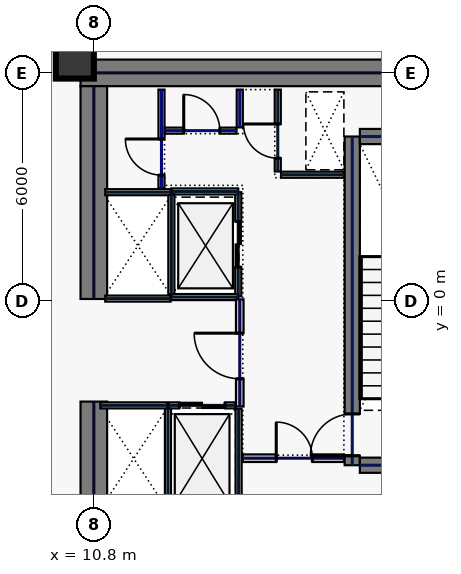
"""IFC4 building model, lengths in metres.
Left out: names, types, materials, properties, quantities, classifications, styles, units other than length and angle.
Written with IfcOpenShell. Run it as: python <this file> out.ifc"""

import sys

from ifc_helpers import new_model, si_unit, direction, frame, frame_2d, origin, origin_2d, place, context, subcontext, project, spatial, rectangle, hollow_rectangle, extrude, element, fill, save


model = new_model("IFC4")
c1 = context("Model", 3, precision=1e-05, world=origin(), true_north=direction((0.0, 1.0)))
c2 = subcontext(c1, "Body", "Model", "MODEL_VIEW")
j1 = project(units=[si_unit("LENGTHUNIT", "METRE"), si_unit("PLANEANGLEUNIT", "RADIAN")], contexts=[c1])
p1 = place(None, origin())
s1 = spatial("IfcSite", under=j1, at=p1, CompositionType="ELEMENT")
p2 = place(p1, origin())
s2 = spatial("IfcBuilding", under=s1, at=p2, CompositionType="ELEMENT")
p3 = place(p2, frame((0.0, 0.0, 89.4)))
s3 = spatial("IfcBuildingStorey", under=s2, at=p3, CompositionType="ELEMENT", Elevation=89.4)
p4 = place(p3, frame((10.45, 6.0, 0.0), z_axis=(0.0, 0.0, 1.0), x_axis=(1.0, 0.0, 0.0)))
e1 = element("IfcWall", 1, at=p4, inside=s3, PredefinedType="SHEAR", context=c2, shape_type="SweptSolid", body=[
    extrude(rectangle(XDim=11.55, YDim=0.7, at=frame_2d((5.775, 0.0))), origin(), (0.0, 0.0, 1.0), 3.74),
])
p5 = place(p3, frame((10.8, -5.65, 0.0), z_axis=(0.0, 0.0, 1.0), x_axis=(0.0, 1.0, 0.0)))
e2 = element("IfcWall", 2, at=p5, inside=s3, PredefinedType="SHEAR", context=c2, shape_type="SweptSolid", body=[
    extrude(rectangle(XDim=3.0, YDim=0.7, at=frame_2d((1.5, 0.0))), origin(), (0.0, 0.0, 1.0), 3.74),
])
p6 = place(p3, frame((10.8, 0.05, 0.0), z_axis=(0.0, 0.0, 1.0), x_axis=(0.0, 1.0, 0.0)))
e3 = element("IfcWall", 3, at=p6, inside=s3, PredefinedType="SHEAR", context=c2, shape_type="SweptSolid", body=[
    extrude(rectangle(XDim=5.6, YDim=0.7, at=frame_2d((2.8, 0.0))), origin(), (0.0, 0.0, 1.0), 3.74),
])
p7 = place(p3, frame((17.6, -4.325, 0.0), z_axis=(0.0, 0.0, 1.0), x_axis=(0.0, 1.0, 0.0)))
e4 = element("IfcWall", 4, at=p7, inside=s3, PredefinedType="SHEAR", context=c2, shape_type="SweptSolid", body=[
    extrude(rectangle(XDim=8.65, YDim=0.4, at=frame_2d((4.325, 0.0))), origin(), (0.0, 0.0, 1.0), 3.74),
])
p8 = place(p7, frame((0.25, 0.0, 0.0)))
e5 = element("IfcOpeningElement", 5, at=p8, cuts=e4, PredefinedType="OPENING", context=c2, shape_type="SweptSolid", body=[
    extrude(rectangle(XDim=1.1, YDim=2.2, at=frame_2d((0.55, 1.1))), frame((0.0, 0.21, 0.0), z_axis=(0.0, -1.0, 0.0), x_axis=(1.0, 0.0, 0.0)), (0.0, 0.0, 1.0), 0.42),
])
for number, where, z_axis, x_axis in (
    (6, (17.8, -4.325, 0.0), (0.0, 0.0, 1.0), (1.0, 0.0, 0.0)),
    (7, (17.8, 4.325, 0.0), (0.0, 0.0, 1.0), (1.0, 0.0, 0.0)),
):
    element("IfcWall", number, at=place(p3, frame(where, z_axis=z_axis, x_axis=x_axis)), inside=s3, PredefinedType="SHEAR", context=c2, shape_type="SweptSolid", body=[
        extrude(rectangle(XDim=3.4, YDim=0.4, at=frame_2d((1.7, 0.0))), origin(), (0.0, 0.0, 1.0), 3.74),
    ])
p9 = place(p3, frame((10.3, 6.35, 0.0), z_axis=(0.0, 0.0, 1.0), x_axis=(1.0, 0.0, 0.0)))
e8 = element("IfcColumn", 8, at=p9, inside=s3, PredefinedType="COLUMN", context=c2, shape_type="SweptSolid", body=[
    extrude(hollow_rectangle(XDim=1.0, YDim=1.0, WallThickness=0.045, at=origin_2d()), origin(), (0.0, 0.0, 1.0), 3.74),
])
p10 = place(p3, frame((14.6, 0.12, 0.0), z_axis=(0.0, 0.0, 1.0), x_axis=(0.0, 1.0, 0.0)))
e9 = element("IfcWall", 9, at=p10, inside=s3, PredefinedType="PARTITIONING", context=c2, shape_type="SweptSolid", body=[
    extrude(rectangle(XDim=2.74, YDim=0.16, at=frame_2d((1.37, 0.0))), origin(), (0.0, 0.0, 1.0), 3.74),
])
p11 = place(p10, frame((0.77, 0.0, 0.0)))
e10 = element("IfcOpeningElement", 10, at=p11, cuts=e9, PredefinedType="OPENING", context=c2, shape_type="SweptSolid", body=[
    extrude(rectangle(XDim=1.2, YDim=2.2, at=frame_2d((0.6, 1.1))), frame((0.0, 0.09, 0.0), z_axis=(0.0, -1.0, 0.0), x_axis=(1.0, 0.0, 0.0)), (0.0, 0.0, 1.0), 0.18),
])
for number, where, z_axis, x_axis in (
    (11, (12.84, 0.1, 0.0), (0.0, 0.0, 1.0), (1.0, 0.0, 0.0)),
    (12, (12.84, 2.88, 0.0), (0.0, 0.0, 1.0), (1.0, 0.0, 0.0)),
):
    element("IfcWall", number, at=place(p3, frame(where, z_axis=z_axis, x_axis=x_axis)), inside=s3, PredefinedType="PARTITIONING", context=c2, shape_type="SweptSolid", body=[
        extrude(rectangle(XDim=1.76, YDim=0.16, at=frame_2d((0.88, 0.0))), origin(), (0.0, 0.0, 1.0), 3.74),
    ])
p12 = place(p3, frame((12.84, 0.18, 0.0), z_axis=(0.0, 0.0, 1.0), x_axis=(0.0, 1.0, 0.0)))
e13 = element("IfcWall", 13, at=p12, inside=s3, PredefinedType="PARTITIONING", context=c2, shape_type="SweptSolid", body=[
    extrude(rectangle(XDim=2.62, YDim=0.16, at=frame_2d((1.31, 0.0))), origin(), (0.0, 0.0, 1.0), 3.74),
])
p13 = place(p3, frame((12.77, -2.75, 0.0), z_axis=(0.0, 0.0, 1.0), x_axis=(1.0, 0.0, 0.0)))
e14 = element("IfcWall", 14, at=p13, inside=s3, PredefinedType="PARTITIONING", context=c2, shape_type="SweptSolid", body=[
    extrude(rectangle(XDim=1.76, YDim=0.16, at=frame_2d((0.88, 0.0))), origin(), (0.0, 0.0, 1.0), 3.74),
])
p14 = place(p13, frame((0.28, 0.0, 0.0)))
e15 = element("IfcOpeningElement", 15, at=p14, cuts=e14, PredefinedType="OPENING", context=c2, shape_type="SweptSolid", body=[
    extrude(rectangle(XDim=1.2, YDim=2.2, at=frame_2d((0.6, 1.1))), frame((0.0, 0.09, 0.0), z_axis=(0.0, -1.0, 0.0), x_axis=(1.0, 0.0, 0.0)), (0.0, 0.0, 1.0), 0.18),
])
for number, where, z_axis, x_axis in (
    (16, (12.75, -5.54, 0.0), (0.0, 0.0, 1.0), (0.0, 1.0, 0.0)),
    (17, (14.61, -5.54, 0.0), (0.0, 0.0, 1.0), (0.0, 1.0, 0.0)),
):
    element("IfcWall", number, at=place(p3, frame(where, z_axis=z_axis, x_axis=x_axis)), inside=s3, PredefinedType="PARTITIONING", context=c2, shape_type="SweptSolid", body=[
        extrude(rectangle(XDim=2.7, YDim=0.16, at=frame_2d((1.35, 0.0))), origin(), (0.0, 0.0, 1.0), 3.74),
    ])
p15 = place(p3, frame((10.97, -2.75, 0.0), z_axis=(0.0, 0.0, 1.0), x_axis=(1.0, 0.0, 0.0)))
e18 = element("IfcWall", 18, at=p15, inside=s3, PredefinedType="PARTITIONING", context=c2, shape_type="SweptSolid", body=[
    extrude(rectangle(XDim=1.76, YDim=0.16, at=frame_2d((0.88, 0.0))), origin(), (0.0, 0.0, 1.0), 3.74),
])
for number, where, z_axis, x_axis in (
    (19, (11.1, 0.06, 0.0), (0.0, 0.0, 1.0), (1.0, 0.0, 0.0)),
    (20, (11.1, 2.86, 0.0), (0.0, 0.0, 1.0), (1.0, 0.0, 0.0)),
):
    element("IfcWall", number, at=place(p3, frame(where, z_axis=z_axis, x_axis=x_axis)), inside=s3, PredefinedType="PARTITIONING", context=c2, shape_type="SweptSolid", body=[
        extrude(rectangle(XDim=1.72, YDim=0.16, at=frame_2d((0.86, 0.0))), origin(), (0.0, 0.0, 1.0), 3.74),
    ])
p16 = place(p3, frame((15.64, 3.405, 0.0), z_axis=(0.0, 0.0, 1.0), x_axis=(0.0, 1.0, 0.0)))
e21 = element("IfcWall", 21, at=p16, inside=s3, PredefinedType="PARTITIONING", context=c2, shape_type="SweptSolid", body=[
    extrude(rectangle(XDim=2.155, YDim=0.16, at=frame_2d((1.078, 0.0))), origin(), (0.0, 0.0, 1.0), 3.74),
])
p17 = place(p16, frame((0.35, 0.0, 0.0)))
e22 = element("IfcOpeningElement", 22, at=p17, cuts=e21, PredefinedType="OPENING", context=c2, shape_type="SweptSolid", body=[
    extrude(rectangle(XDim=0.9, YDim=2.2, at=frame_2d((0.45, 1.1))), frame((0.0, 0.09, 0.0), z_axis=(0.0, -1.0, 0.0), x_axis=(1.0, 0.0, 0.0)), (0.0, 0.0, 1.0), 0.18),
])
p18 = place(p3, frame((15.725, 3.32, 0.0), z_axis=(0.0, 0.0, 1.0), x_axis=(1.0, 0.0, 0.0)))
e23 = element("IfcWall", 23, at=p18, inside=s3, PredefinedType="PARTITIONING", context=c2, shape_type="SweptSolid", body=[
    extrude(rectangle(XDim=1.655, YDim=0.16, at=frame_2d((0.827, 0.0))), origin(), (0.0, 0.0, 1.0), 3.74),
])
p19 = place(p3, frame((14.72, -4.14, 0.0), z_axis=(0.0, 0.0, 1.0), x_axis=(1.0, 0.0, 0.0)))
e24 = element("IfcWall", 24, at=p19, inside=s3, PredefinedType="SOLIDWALL", context=c2, shape_type="SweptSolid", body=[
    extrude(rectangle(XDim=2.66, YDim=0.2, at=frame_2d((1.33, 0.0))), origin(), (0.0, 0.0, 1.0), 3.74),
])
p20 = place(p19, frame((0.88, 0.0, 0.0)))
e25 = element("IfcOpeningElement", 25, at=p20, cuts=e24, PredefinedType="OPENING", context=c2, shape_type="SweptSolid", body=[
    extrude(rectangle(XDim=0.95, YDim=2.2, at=frame_2d((0.475, 1.1))), frame((0.0, 0.11, 0.0), z_axis=(0.0, -1.0, 0.0), x_axis=(1.0, 0.0, 0.0)), (0.0, 0.0, 1.0), 0.22),
])
p21 = place(p3, frame((12.58, 2.96, 0.0), z_axis=(0.0, 0.0, 1.0), x_axis=(0.0, 1.0, 0.0)))
e26 = element("IfcWall", 26, at=p21, inside=s3, PredefinedType="PARTITIONING", context=c2, shape_type="SweptSolid", body=[
    extrude(rectangle(XDim=2.6, YDim=0.16, at=frame_2d((1.3, 0.0))), origin(), (0.0, 0.0, 1.0), 3.74),
])
p22 = place(p21, frame((0.35, 0.0, 0.0)))
e27 = element("IfcOpeningElement", 27, at=p22, cuts=e26, PredefinedType="OPENING", context=c2, shape_type="SweptSolid", body=[
    extrude(rectangle(XDim=0.95, YDim=2.2, at=frame_2d((0.475, 1.1))), frame((0.0, 0.09, 0.0), z_axis=(0.0, -1.0, 0.0), x_axis=(1.0, 0.0, 0.0)), (0.0, 0.0, 1.0), 0.18),
])
p23 = place(p3, frame((12.665, 4.48, 0.0), z_axis=(0.0, 0.0, 1.0), x_axis=(1.0, 0.0, 0.0)))
e28 = element("IfcWall", 28, at=p23, inside=s3, PredefinedType="PARTITIONING", context=c2, shape_type="SweptSolid", body=[
    extrude(rectangle(XDim=1.89, YDim=0.16, at=frame_2d((0.945, 0.0))), origin(), (0.0, 0.0, 1.0), 3.74),
])
p24 = place(p23, frame((0.5, 0.0, 0.0)))
e29 = element("IfcOpeningElement", 29, at=p24, cuts=e28, PredefinedType="OPENING", context=c2, shape_type="SweptSolid", body=[
    extrude(rectangle(XDim=0.95, YDim=2.2, at=frame_2d((0.475, 1.1))), frame((0.0, 0.09, 0.0), z_axis=(0.0, -1.0, 0.0), x_axis=(1.0, 0.0, 0.0)), (0.0, 0.0, 1.0), 0.18),
])
p25 = place(p3, frame((14.64, 4.565, 0.0), z_axis=(0.0, 0.0, 1.0), x_axis=(0.0, 1.0, 0.0)))
e30 = element("IfcWall", 30, at=p25, inside=s3, PredefinedType="PARTITIONING", context=c2, shape_type="SweptSolid", body=[
    extrude(rectangle(XDim=0.995, YDim=0.16, at=frame_2d((0.498, 0.0))), origin(), (0.0, 0.0, 1.0), 3.74),
])
p26 = place(p3, frame((14.64, -2.78, 0.0), z_axis=(0.0, 0.0, 1.0), x_axis=(0.0, 1.0, 0.0)))
e31 = element("IfcWall", 31, at=p26, inside=s3, PredefinedType="SOLIDWALL", context=c2, shape_type="SweptSolid", body=[
    extrude(rectangle(XDim=2.82, YDim=0.2, at=frame_2d((1.41, 0.0))), origin(), (0.0, 0.0, 1.0), 3.74),
])
p27 = place(p26, frame((0.73, 0.0, 0.0)))
e32 = element("IfcOpeningElement", 32, at=p27, cuts=e31, PredefinedType="OPENING", context=c2, shape_type="SweptSolid", body=[
    extrude(rectangle(XDim=1.2, YDim=2.2, at=frame_2d((0.6, 1.1))), frame((0.0, 0.11, 0.0), z_axis=(0.0, -1.0, 0.0), x_axis=(1.0, 0.0, 0.0)), (0.0, 0.0, 1.0), 0.22),
])
p28 = place(p3, frame((10.58, 7.435, 0.0), z_axis=(0.0, 0.0, 1.0), x_axis=(0.0, -1.0, 0.0)))
e33 = element("IfcWall", 33, at=p28, inside=s3, PredefinedType="PARTITIONING", context=c2, shape_type="SweptSolid", body=[
    extrude(rectangle(XDim=1.015, YDim=0.16, at=frame_2d((0.508, 0.0))), origin(), (0.0, 0.0, 1.0), 2.135),
])
p29 = place(p8, origin())
e34 = element("IfcDoor", 34, at=p29, inside=s3, OperationType="SINGLE_SWING_LEFT", PredefinedType="DOOR", context=c2, shape_type="SweptSolid", body=[
    extrude(rectangle(XDim=1.1, YDim=2.2, at=frame_2d((0.55, 1.1))), frame((0.0, 0.025, 0.0), z_axis=(0.0, -1.0, 0.0), x_axis=(1.0, 0.0, 0.0)), (0.0, 0.0, 1.0), 0.05),
])
fill(e5, e34)
p30 = place(p11, origin())
e35 = element("IfcDoor", 35, at=p30, inside=s3, OperationType="SLIDING_TO_LEFT", PredefinedType="DOOR", context=c2, shape_type="SweptSolid", body=[
    extrude(rectangle(XDim=1.2, YDim=2.2, at=frame_2d((0.6, 1.1))), frame((0.0, 0.025, 0.0), z_axis=(0.0, -1.0, 0.0), x_axis=(1.0, 0.0, 0.0)), (0.0, 0.0, 1.0), 0.05),
])
fill(e10, e35)
p31 = place(p14, origin())
e36 = element("IfcDoor", 36, at=p31, inside=s3, OperationType="SLIDING_TO_LEFT", PredefinedType="DOOR", context=c2, shape_type="SweptSolid", body=[
    extrude(rectangle(XDim=1.2, YDim=2.2, at=frame_2d((0.6, 1.1))), frame((0.0, 0.025, 0.0), z_axis=(0.0, -1.0, 0.0), x_axis=(1.0, 0.0, 0.0)), (0.0, 0.0, 1.0), 0.05),
])
fill(e15, e36)
p32 = place(p17, origin())
e37 = element("IfcDoor", 37, at=p32, inside=s3, OperationType="SINGLE_SWING_RIGHT", PredefinedType="DOOR", context=c2, shape_type="SweptSolid", body=[
    extrude(rectangle(XDim=0.9, YDim=2.2, at=frame_2d((0.45, 1.1))), frame((0.0, 0.025, 0.0), z_axis=(0.0, -1.0, 0.0), x_axis=(1.0, 0.0, 0.0)), (0.0, 0.0, 1.0), 0.05),
])
fill(e22, e37)
p33 = place(p20, origin())
e38 = element("IfcDoor", 38, at=p33, inside=s3, OperationType="SINGLE_SWING_LEFT", PredefinedType="DOOR", context=c2, shape_type="SweptSolid", body=[
    extrude(rectangle(XDim=0.95, YDim=2.2, at=frame_2d((0.475, 1.1))), frame((0.0, 0.025, 0.0), z_axis=(0.0, -1.0, 0.0), x_axis=(1.0, 0.0, 0.0)), (0.0, 0.0, 1.0), 0.05),
])
fill(e25, e38)
p34 = place(p22, origin())
e39 = element("IfcDoor", 39, at=p34, inside=s3, OperationType="SINGLE_SWING_RIGHT", PredefinedType="DOOR", context=c2, shape_type="SweptSolid", body=[
    extrude(rectangle(XDim=0.95, YDim=2.2, at=frame_2d((0.475, 1.1))), frame((0.0, 0.025, 0.0), z_axis=(0.0, -1.0, 0.0), x_axis=(1.0, 0.0, 0.0)), (0.0, 0.0, 1.0), 0.05),
])
fill(e27, e39)
p35 = place(p24, origin())
e40 = element("IfcDoor", 40, at=p35, inside=s3, OperationType="SINGLE_SWING_LEFT", PredefinedType="DOOR", context=c2, shape_type="SweptSolid", body=[
    extrude(rectangle(XDim=0.95, YDim=2.2, at=frame_2d((0.475, 1.1))), frame((0.0, 0.025, 0.0), z_axis=(0.0, -1.0, 0.0), x_axis=(1.0, 0.0, 0.0)), (0.0, 0.0, 1.0), 0.05),
])
fill(e29, e40)
p36 = place(p27, origin())
e41 = element("IfcDoor", 41, at=p36, inside=s3, OperationType="SINGLE_SWING_RIGHT", PredefinedType="DOOR", context=c2, shape_type="SweptSolid", body=[
    extrude(rectangle(XDim=1.2, YDim=2.2, at=frame_2d((0.6, 1.1))), frame((0.0, 0.025, 0.0), z_axis=(0.0, -1.0, 0.0), x_axis=(1.0, 0.0, 0.0)), (0.0, 0.0, 1.0), 0.05),
])
fill(e32, e41)
save(model, sys.argv[1])
